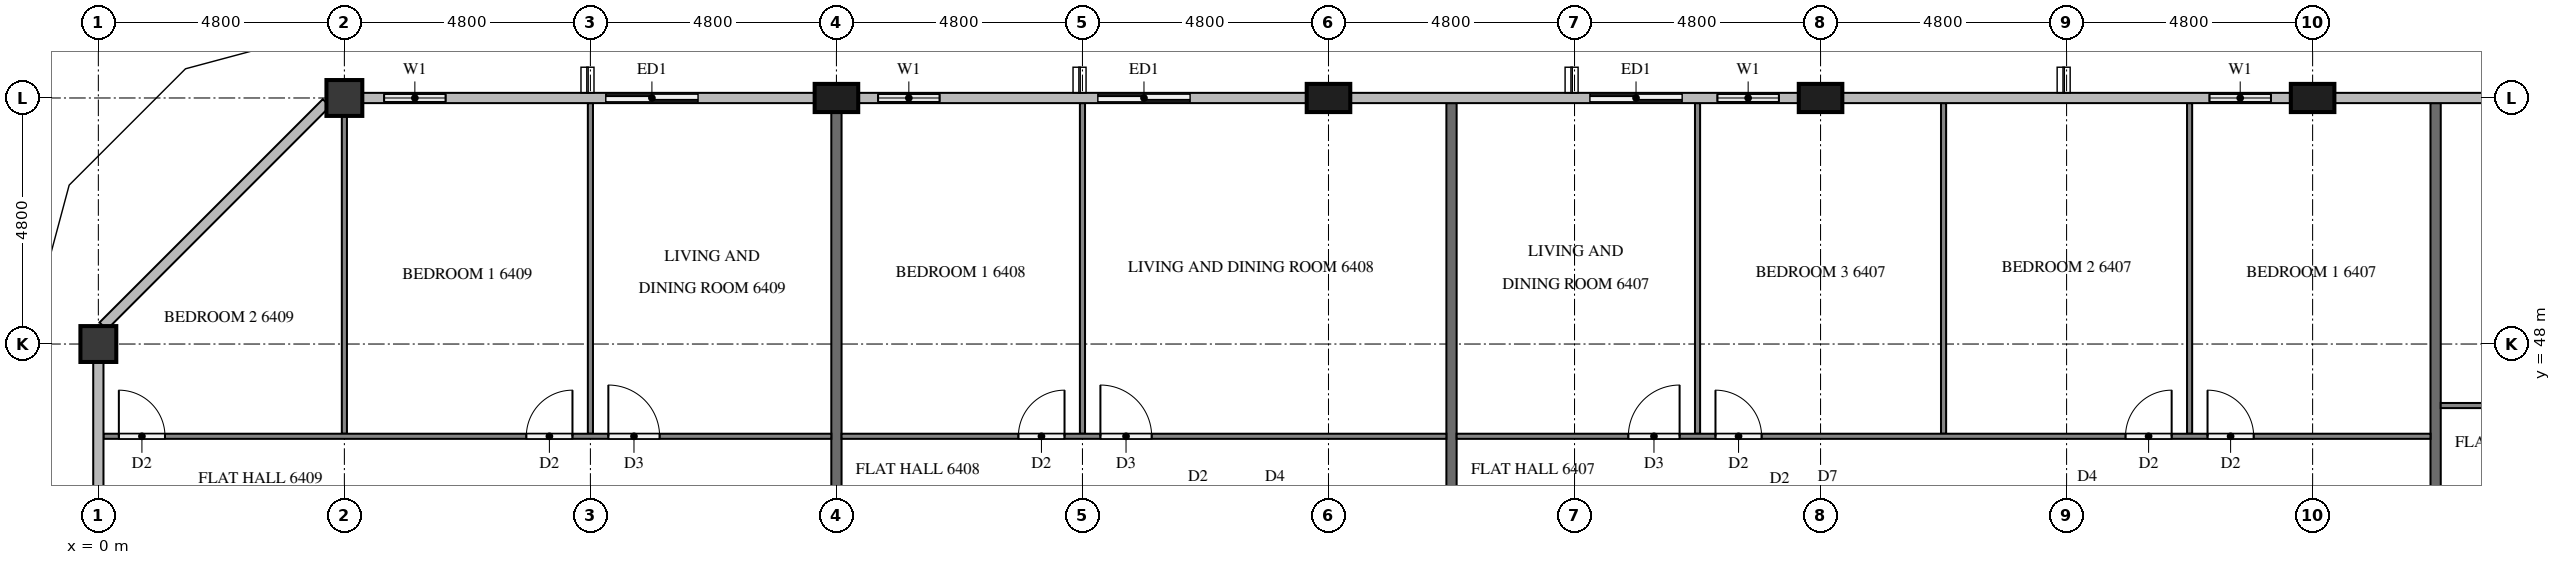
"""IFC4 building model, lengths in metres.
Left out: names, types, materials, properties, quantities, classifications, styles, units other than length and angle.
Written with IfcOpenShell. Run it as: python <this file> out.ifc"""

import sys

from ifc_helpers import new_model, si_unit, direction, frame, frame_2d, origin, origin_2d, place, context, subcontext, project, spatial, rectangle, extrude, element, fill, save


model = new_model("IFC4")
c1 = context("Model", 3, precision=1e-05, world=origin(), true_north=direction((0.0, 1.0)))
c2 = subcontext(c1, "Body", "Model", "MODEL_VIEW")
j1 = project(units=[si_unit("LENGTHUNIT", "METRE"), si_unit("PLANEANGLEUNIT", "RADIAN")], contexts=[c1])
p1 = place(None, origin())
s1 = spatial("IfcSite", under=j1, at=p1, CompositionType="ELEMENT")
p2 = place(p1, origin())
s2 = spatial("IfcBuilding", under=s1, at=p2, CompositionType="ELEMENT")
p3 = place(p2, frame((0.0, 0.0, 245.7)))
s3 = spatial("IfcBuildingStorey", under=s2, at=p3, CompositionType="ELEMENT", Elevation=245.7)
for number, where, z_axis, x_axis in (
    (1, (43.2, 52.8, 0.0), (0.0, 0.0, 1.0), (1.0, 0.0, 0.0)),
    (2, (33.6, 52.8, 0.0), (0.0, 0.0, 1.0), (1.0, 0.0, 0.0)),
    (3, (24.0, 52.8, 0.0), (0.0, 0.0, 1.0), (1.0, 0.0, 0.0)),
    (4, (14.4, 52.8, 0.0), (0.0, 0.0, 1.0), (1.0, 0.0, 0.0)),
):
    element("IfcColumn", number, at=place(p3, frame(where, z_axis=z_axis, x_axis=x_axis)), inside=s3, PredefinedType="COLUMN", context=c2, shape_type="SweptSolid", body=[
        extrude(rectangle(XDim=0.85, YDim=0.55, at=origin_2d()), origin(), (0.0, 0.0, 1.0), 3.2),
    ])
for number, where, z_axis, x_axis in (
    (5, (4.8, 52.8, 0.0), (0.0, 0.0, 1.0), (1.0, 0.0, 0.0)),
    (6, (0.0, 48.0, 0.0), (0.0, 0.0, 1.0), (1.0, 0.0, 0.0)),
):
    element("IfcColumn", number, at=place(p3, frame(where, z_axis=z_axis, x_axis=x_axis)), inside=s3, PredefinedType="COLUMN", context=c2, shape_type="SweptSolid", body=[
        extrude(rectangle(XDim=0.7, YDim=0.7, at=origin_2d()), origin(), (0.0, 0.0, 1.0), 3.2),
    ])
p4 = place(p3, frame((42.775, 52.8, 0.0), z_axis=(0.0, 0.0, 1.0), x_axis=(-1.0, 0.0, 0.0)))
e7 = element("IfcWall", 7, at=p4, inside=s3, PredefinedType="SOLIDWALL", context=c2, shape_type="SweptSolid", body=[
    extrude(rectangle(XDim=1.975, YDim=0.15, at=frame_2d((0.987, 0.0))), origin(), (0.0, 0.0, 1.0), 3.2),
])
p5 = place(p4, frame((0.387, 0.0, 0.9)))
e8 = element("IfcOpeningElement", 8, at=p5, cuts=e7, PredefinedType="OPENING", context=c2, shape_type="SweptSolid", body=[
    extrude(rectangle(XDim=1.2, YDim=1.4, at=frame_2d((0.6, 0.7))), frame((0.0, 0.085, 0.0), z_axis=(0.0, -1.0, 0.0), x_axis=(1.0, 0.0, 0.0)), (0.0, 0.0, 1.0), 0.17),
])
p6 = place(p3, frame((33.175, 52.8, 0.0), z_axis=(0.0, 0.0, 1.0), x_axis=(-1.0, 0.0, 0.0)))
e9 = element("IfcWall", 9, at=p6, inside=s3, PredefinedType="SOLIDWALL", context=c2, shape_type="SweptSolid", body=[
    extrude(rectangle(XDim=4.375, YDim=0.15, at=frame_2d((2.188, 0.0))), origin(), (0.0, 0.0, 1.0), 3.2),
])
p7 = place(p6, frame((0.387, 0.0, 0.9)))
e10 = element("IfcOpeningElement", 10, at=p7, cuts=e9, PredefinedType="OPENING", context=c2, shape_type="SweptSolid", body=[
    extrude(rectangle(XDim=1.2, YDim=1.4, at=frame_2d((0.6, 0.7))), frame((0.0, 0.085, 0.0), z_axis=(0.0, -1.0, 0.0), x_axis=(1.0, 0.0, 0.0)), (0.0, 0.0, 1.0), 0.17),
])
p8 = place(p6, frame((2.275, 0.0, 0.0)))
e11 = element("IfcOpeningElement", 11, at=p8, cuts=e9, PredefinedType="OPENING", context=c2, shape_type="SweptSolid", body=[
    extrude(rectangle(XDim=1.8, YDim=2.4, at=frame_2d((0.9, 1.2))), frame((0.0, 0.085, 0.0), z_axis=(0.0, -1.0, 0.0), x_axis=(1.0, 0.0, 0.0)), (0.0, 0.0, 1.0), 0.17),
])
p9 = place(p3, frame((21.6, 52.8, 0.0), z_axis=(0.0, 0.0, 1.0), x_axis=(-1.0, 0.0, 0.0)))
e12 = element("IfcWall", 12, at=p9, inside=s3, PredefinedType="SOLIDWALL", context=c2, shape_type="SweptSolid", body=[
    extrude(rectangle(XDim=2.4, YDim=0.15, at=frame_2d((1.2, 0.0))), origin(), (0.0, 0.0, 1.0), 3.2),
])
p10 = place(p9, frame((0.3, 0.0, 0.0)))
e13 = element("IfcOpeningElement", 13, at=p10, cuts=e12, PredefinedType="OPENING", context=c2, shape_type="SweptSolid", body=[
    extrude(rectangle(XDim=1.8, YDim=2.4, at=frame_2d((0.9, 1.2))), frame((0.0, 0.085, 0.0), z_axis=(0.0, -1.0, 0.0), x_axis=(1.0, 0.0, 0.0)), (0.0, 0.0, 1.0), 0.17),
])
p11 = place(p3, frame((16.8, 52.8, 0.0), z_axis=(0.0, 0.0, 1.0), x_axis=(-1.0, 0.0, 0.0)))
e14 = element("IfcWall", 14, at=p11, inside=s3, PredefinedType="SOLIDWALL", context=c2, shape_type="SweptSolid", body=[
    extrude(rectangle(XDim=1.975, YDim=0.15, at=frame_2d((0.988, 0.0))), origin(), (0.0, 0.0, 1.0), 3.2),
])
p12 = place(p11, frame((0.387, 0.0, 0.9)))
e15 = element("IfcOpeningElement", 15, at=p12, cuts=e14, PredefinedType="OPENING", context=c2, shape_type="SweptSolid", body=[
    extrude(rectangle(XDim=1.2, YDim=1.4, at=frame_2d((0.6, 0.7))), frame((0.0, 0.085, 0.0), z_axis=(0.0, -1.0, 0.0), x_axis=(1.0, 0.0, 0.0)), (0.0, 0.0, 1.0), 0.17),
])
p13 = place(p3, frame((12.0, 52.8, 0.0), z_axis=(0.0, 0.0, 1.0), x_axis=(-1.0, 0.0, 0.0)))
e16 = element("IfcWall", 16, at=p13, inside=s3, PredefinedType="SOLIDWALL", context=c2, shape_type="SweptSolid", body=[
    extrude(rectangle(XDim=2.4, YDim=0.15, at=frame_2d((1.2, 0.0))), origin(), (0.0, 0.0, 1.0), 3.2),
])
p14 = place(p13, frame((0.3, 0.0, 0.0)))
e17 = element("IfcOpeningElement", 17, at=p14, cuts=e16, PredefinedType="OPENING", context=c2, shape_type="SweptSolid", body=[
    extrude(rectangle(XDim=1.8, YDim=2.4, at=frame_2d((0.9, 1.2))), frame((0.0, 0.085, 0.0), z_axis=(0.0, -1.0, 0.0), x_axis=(1.0, 0.0, 0.0)), (0.0, 0.0, 1.0), 0.17),
])
p15 = place(p3, frame((7.2, 52.8, 0.0), z_axis=(0.0, 0.0, 1.0), x_axis=(-1.0, 0.0, 0.0)))
e18 = element("IfcWall", 18, at=p15, inside=s3, PredefinedType="SOLIDWALL", context=c2, shape_type="SweptSolid", body=[
    extrude(rectangle(XDim=2.05, YDim=0.15, at=frame_2d((1.025, 0.0))), origin(), (0.0, 0.0, 1.0), 3.2),
])
p16 = place(p15, frame((0.425, 0.0, 0.9)))
e19 = element("IfcOpeningElement", 19, at=p16, cuts=e18, PredefinedType="OPENING", context=c2, shape_type="SweptSolid", body=[
    extrude(rectangle(XDim=1.2, YDim=1.4, at=frame_2d((0.6, 0.7))), frame((0.0, 0.085, 0.0), z_axis=(0.0, -1.0, 0.0), x_axis=(1.0, 0.0, 0.0)), (0.0, 0.0, 1.0), 0.17),
])
for number, where, z_axis, x_axis in (
    (20, (45.6, 52.7, 0.0), (0.0, 0.0, 1.0), (0.0, -1.0, 0.0)),
    (21, (26.4, 52.7, 0.0), (0.0, 0.0, 1.0), (0.0, -1.0, 0.0)),
):
    element("IfcWall", number, at=place(p3, frame(where, z_axis=z_axis, x_axis=x_axis)), inside=s3, PredefinedType="PARTITIONING", context=c2, shape_type="SweptSolid", body=[
        extrude(rectangle(XDim=11.8, YDim=0.2, at=frame_2d((5.9, 0.0))), origin(), (0.0, 0.0, 1.0), 3.2),
    ])
p17 = place(p3, frame((14.4, 52.525, 0.0), z_axis=(0.0, 0.0, 1.0), x_axis=(0.0, -1.0, 0.0)))
e22 = element("IfcWall", 22, at=p17, inside=s3, PredefinedType="PARTITIONING", context=c2, shape_type="SweptSolid", body=[
    extrude(rectangle(XDim=11.625, YDim=0.2, at=frame_2d((5.812, 0.0))), origin(), (0.0, 0.0, 1.0), 3.2),
])
p18 = place(p3, frame((45.7, 46.8, 0.0), z_axis=(0.0, 0.0, 1.0), x_axis=(1.0, 0.0, 0.0)))
e23 = element("IfcWall", 23, at=p18, inside=s3, PredefinedType="PARTITIONING", context=c2, shape_type="SweptSolid", body=[
    extrude(rectangle(XDim=11.8, YDim=0.1, at=frame_2d((5.9, 0.0))), origin(), (0.0, 0.0, 1.0), 3.2),
])
p19 = place(p18, frame((3.45, 0.0, 0.0)))
e24 = element("IfcOpeningElement", 24, at=p19, cuts=e23, PredefinedType="OPENING", context=c2, shape_type="SweptSolid", body=[
    extrude(rectangle(XDim=0.9, YDim=2.1, at=frame_2d((0.45, 1.05))), frame((0.0, 0.06, 0.0), z_axis=(0.0, -1.0, 0.0), x_axis=(1.0, 0.0, 0.0)), (0.0, 0.0, 1.0), 0.12),
])
p20 = place(p18, frame((5.05, 0.0, 0.0)))
e25 = element("IfcOpeningElement", 25, at=p20, cuts=e23, PredefinedType="OPENING", context=c2, shape_type="SweptSolid", body=[
    extrude(rectangle(XDim=1.0, YDim=2.1, at=frame_2d((0.5, 1.05))), frame((0.0, 0.06, 0.0), z_axis=(0.0, -1.0, 0.0), x_axis=(1.0, 0.0, 0.0)), (0.0, 0.0, 1.0), 0.12),
])
for number, where, z_axis, x_axis in (
    (26, (40.8, 46.25, 0.0), (0.0, 0.0, 1.0), (0.0, 1.0, 0.0)),
    (27, (36.0, 46.25, 0.0), (0.0, 0.0, 1.0), (0.0, 1.0, 0.0)),
    (28, (31.2, 46.25, 0.0), (0.0, 0.0, 1.0), (0.0, 1.0, 0.0)),
):
    element("IfcWall", number, at=place(p3, frame(where, z_axis=z_axis, x_axis=x_axis)), inside=s3, PredefinedType="PARTITIONING", context=c2, shape_type="SweptSolid", body=[
        extrude(rectangle(XDim=6.45, YDim=0.1, at=frame_2d((3.225, 0.0))), origin(), (0.0, 0.0, 1.0), 3.2),
    ])
p21 = place(p3, frame((26.5, 46.2, 0.0), z_axis=(0.0, 0.0, 1.0), x_axis=(1.0, 0.0, 0.0)))
e29 = element("IfcWall", 29, at=p21, inside=s3, PredefinedType="PARTITIONING", context=c2, shape_type="SweptSolid", body=[
    extrude(rectangle(XDim=19.0, YDim=0.1, at=frame_2d((9.5, 0.0))), origin(), (0.0, 0.0, 1.0), 3.2),
])
p22 = place(p21, frame((14.65, 0.0, 0.0)))
e30 = element("IfcOpeningElement", 30, at=p22, cuts=e29, PredefinedType="OPENING", context=c2, shape_type="SweptSolid", body=[
    extrude(rectangle(XDim=0.9, YDim=2.1, at=frame_2d((0.45, 1.05))), frame((0.0, 0.06, 0.0), z_axis=(0.0, -1.0, 0.0), x_axis=(1.0, 0.0, 0.0)), (0.0, 0.0, 1.0), 0.12),
])
p23 = place(p21, frame((13.05, 0.0, 0.0)))
e31 = element("IfcOpeningElement", 31, at=p23, cuts=e29, PredefinedType="OPENING", context=c2, shape_type="SweptSolid", body=[
    extrude(rectangle(XDim=0.9, YDim=2.1, at=frame_2d((0.45, 1.05))), frame((0.0, 0.06, 0.0), z_axis=(0.0, -1.0, 0.0), x_axis=(1.0, 0.0, 0.0)), (0.0, 0.0, 1.0), 0.12),
])
p24 = place(p21, frame((5.05, 0.0, 0.0)))
e32 = element("IfcOpeningElement", 32, at=p24, cuts=e29, PredefinedType="OPENING", context=c2, shape_type="SweptSolid", body=[
    extrude(rectangle(XDim=0.9, YDim=2.1, at=frame_2d((0.45, 1.05))), frame((0.0, 0.06, 0.0), z_axis=(0.0, -1.0, 0.0), x_axis=(1.0, 0.0, 0.0)), (0.0, 0.0, 1.0), 0.12),
])
p25 = place(p21, frame((3.35, 0.0, 0.0)))
e33 = element("IfcOpeningElement", 33, at=p25, cuts=e29, PredefinedType="OPENING", context=c2, shape_type="SweptSolid", body=[
    extrude(rectangle(XDim=1.0, YDim=2.1, at=frame_2d((0.5, 1.05))), frame((0.0, 0.06, 0.0), z_axis=(0.0, -1.0, 0.0), x_axis=(1.0, 0.0, 0.0)), (0.0, 0.0, 1.0), 0.12),
])
p26 = place(p3, frame((19.2, 46.25, 0.0), z_axis=(0.0, 0.0, 1.0), x_axis=(0.0, 1.0, 0.0)))
e34 = element("IfcWall", 34, at=p26, inside=s3, PredefinedType="PARTITIONING", context=c2, shape_type="SweptSolid", body=[
    extrude(rectangle(XDim=6.45, YDim=0.1, at=frame_2d((3.225, 0.0))), origin(), (0.0, 0.0, 1.0), 3.2),
])
p27 = place(p3, frame((14.5, 46.2, 0.0), z_axis=(0.0, 0.0, 1.0), x_axis=(1.0, 0.0, 0.0)))
e35 = element("IfcWall", 35, at=p27, inside=s3, PredefinedType="PARTITIONING", context=c2, shape_type="SweptSolid", body=[
    extrude(rectangle(XDim=11.8, YDim=0.1, at=frame_2d((5.9, 0.0))), origin(), (0.0, 0.0, 1.0), 3.2),
])
p28 = place(p27, frame((3.45, 0.0, 0.0)))
e36 = element("IfcOpeningElement", 36, at=p28, cuts=e35, PredefinedType="OPENING", context=c2, shape_type="SweptSolid", body=[
    extrude(rectangle(XDim=0.9, YDim=2.1, at=frame_2d((0.45, 1.05))), frame((0.0, 0.06, 0.0), z_axis=(0.0, -1.0, 0.0), x_axis=(1.0, 0.0, 0.0)), (0.0, 0.0, 1.0), 0.12),
])
p29 = place(p27, frame((5.05, 0.0, 0.0)))
e37 = element("IfcOpeningElement", 37, at=p29, cuts=e35, PredefinedType="OPENING", context=c2, shape_type="SweptSolid", body=[
    extrude(rectangle(XDim=1.0, YDim=2.1, at=frame_2d((0.5, 1.05))), frame((0.0, 0.06, 0.0), z_axis=(0.0, -1.0, 0.0), x_axis=(1.0, 0.0, 0.0)), (0.0, 0.0, 1.0), 0.12),
])
p30 = place(p3, frame((9.6, 46.25, 0.0), z_axis=(0.0, 0.0, 1.0), x_axis=(0.0, 1.0, 0.0)))
e38 = element("IfcWall", 38, at=p30, inside=s3, PredefinedType="PARTITIONING", context=c2, shape_type="SweptSolid", body=[
    extrude(rectangle(XDim=6.45, YDim=0.1, at=frame_2d((3.225, 0.0))), origin(), (0.0, 0.0, 1.0), 3.2),
])
p31 = place(p3, frame((4.8, 46.25, 0.0), z_axis=(0.0, 0.0, 1.0), x_axis=(0.0, 1.0, 0.0)))
e39 = element("IfcWall", 39, at=p31, inside=s3, PredefinedType="PARTITIONING", context=c2, shape_type="SweptSolid", body=[
    extrude(rectangle(XDim=6.2, YDim=0.1, at=frame_2d((3.1, 0.0))), origin(), (0.0, 0.0, 1.0), 3.2),
])
p32 = place(p3, frame((0.1, 46.2, 0.0), z_axis=(0.0, 0.0, 1.0), x_axis=(1.0, 0.0, 0.0)))
e40 = element("IfcWall", 40, at=p32, inside=s3, PredefinedType="PARTITIONING", context=c2, shape_type="SweptSolid", body=[
    extrude(rectangle(XDim=14.2, YDim=0.1, at=frame_2d((7.1, 0.0))), origin(), (0.0, 0.0, 1.0), 3.2),
])
p33 = place(p32, frame((9.85, 0.0, 0.0)))
e41 = element("IfcOpeningElement", 41, at=p33, cuts=e40, PredefinedType="OPENING", context=c2, shape_type="SweptSolid", body=[
    extrude(rectangle(XDim=1.0, YDim=2.1, at=frame_2d((0.5, 1.05))), frame((0.0, 0.06, 0.0), z_axis=(0.0, -1.0, 0.0), x_axis=(1.0, 0.0, 0.0)), (0.0, 0.0, 1.0), 0.12),
])
p34 = place(p32, frame((8.25, 0.0, 0.0)))
e42 = element("IfcOpeningElement", 42, at=p34, cuts=e40, PredefinedType="OPENING", context=c2, shape_type="SweptSolid", body=[
    extrude(rectangle(XDim=0.9, YDim=2.1, at=frame_2d((0.45, 1.05))), frame((0.0, 0.06, 0.0), z_axis=(0.0, -1.0, 0.0), x_axis=(1.0, 0.0, 0.0)), (0.0, 0.0, 1.0), 0.12),
])
p35 = place(p32, frame((0.3, 0.0, 0.0)))
e43 = element("IfcOpeningElement", 43, at=p35, cuts=e40, PredefinedType="OPENING", context=c2, shape_type="SweptSolid", body=[
    extrude(rectangle(XDim=0.9, YDim=2.1, at=frame_2d((0.45, 1.05))), frame((0.0, 0.06, 0.0), z_axis=(0.0, -1.0, 0.0), x_axis=(1.0, 0.0, 0.0)), (0.0, 0.0, 1.0), 0.12),
])
p36 = place(p5, origin())
e44 = element("IfcWindow", 44, at=p36, inside=s3, PartitioningType="SINGLE_PANEL", PredefinedType="WINDOW", context=c2, shape_type="SweptSolid", body=[
    extrude(rectangle(XDim=1.2, YDim=1.4, at=frame_2d((0.6, 0.7))), frame((0.0, 0.03, 0.0), z_axis=(0.0, -1.0, 0.0), x_axis=(1.0, 0.0, 0.0)), (0.0, 0.0, 1.0), 0.06),
])
fill(e8, e44)
p37 = place(p7, origin())
e45 = element("IfcWindow", 45, at=p37, inside=s3, PartitioningType="SINGLE_PANEL", PredefinedType="WINDOW", context=c2, shape_type="SweptSolid", body=[
    extrude(rectangle(XDim=1.2, YDim=1.4, at=frame_2d((0.6, 0.7))), frame((0.0, 0.03, 0.0), z_axis=(0.0, -1.0, 0.0), x_axis=(1.0, 0.0, 0.0)), (0.0, 0.0, 1.0), 0.06),
])
fill(e10, e45)
p38 = place(p8, origin())
e46 = element("IfcDoor", 46, at=p38, inside=s3, OperationType="SLIDING_TO_RIGHT", PredefinedType="DOOR", context=c2, shape_type="SweptSolid", body=[
    extrude(rectangle(XDim=1.8, YDim=2.4, at=frame_2d((0.9, 1.2))), frame((0.0, 0.025, 0.0), z_axis=(0.0, -1.0, 0.0), x_axis=(1.0, 0.0, 0.0)), (0.0, 0.0, 1.0), 0.05),
])
fill(e11, e46)
p39 = place(p10, origin())
e47 = element("IfcDoor", 47, at=p39, inside=s3, OperationType="SLIDING_TO_LEFT", PredefinedType="DOOR", context=c2, shape_type="SweptSolid", body=[
    extrude(rectangle(XDim=1.8, YDim=2.4, at=frame_2d((0.9, 1.2))), frame((0.0, 0.025, 0.0), z_axis=(0.0, -1.0, 0.0), x_axis=(1.0, 0.0, 0.0)), (0.0, 0.0, 1.0), 0.05),
])
fill(e13, e47)
p40 = place(p12, origin())
e48 = element("IfcWindow", 48, at=p40, inside=s3, PartitioningType="SINGLE_PANEL", PredefinedType="WINDOW", context=c2, shape_type="SweptSolid", body=[
    extrude(rectangle(XDim=1.2, YDim=1.4, at=frame_2d((0.6, 0.7))), frame((0.0, 0.03, 0.0), z_axis=(0.0, -1.0, 0.0), x_axis=(1.0, 0.0, 0.0)), (0.0, 0.0, 1.0), 0.06),
])
fill(e15, e48)
p41 = place(p14, origin())
e49 = element("IfcDoor", 49, at=p41, inside=s3, OperationType="SLIDING_TO_RIGHT", PredefinedType="DOOR", context=c2, shape_type="SweptSolid", body=[
    extrude(rectangle(XDim=1.8, YDim=2.4, at=frame_2d((0.9, 1.2))), frame((0.0, 0.025, 0.0), z_axis=(0.0, -1.0, 0.0), x_axis=(1.0, 0.0, 0.0)), (0.0, 0.0, 1.0), 0.05),
])
fill(e17, e49)
p42 = place(p16, origin())
e50 = element("IfcWindow", 50, at=p42, inside=s3, PartitioningType="SINGLE_PANEL", PredefinedType="WINDOW", context=c2, shape_type="SweptSolid", body=[
    extrude(rectangle(XDim=1.2, YDim=1.4, at=frame_2d((0.6, 0.7))), frame((0.0, 0.03, 0.0), z_axis=(0.0, -1.0, 0.0), x_axis=(1.0, 0.0, 0.0)), (0.0, 0.0, 1.0), 0.06),
])
fill(e19, e50)
p43 = place(p22, origin())
e51 = element("IfcDoor", 51, at=p43, inside=s3, OperationType="SINGLE_SWING_LEFT", PredefinedType="DOOR", context=c2, shape_type="SweptSolid", body=[
    extrude(rectangle(XDim=0.9, YDim=2.1, at=frame_2d((0.45, 1.05))), frame((0.0, 0.025, 0.0), z_axis=(0.0, -1.0, 0.0), x_axis=(1.0, 0.0, 0.0)), (0.0, 0.0, 1.0), 0.05),
])
fill(e30, e51)
p44 = place(p23, origin())
e52 = element("IfcDoor", 52, at=p44, inside=s3, OperationType="SINGLE_SWING_RIGHT", PredefinedType="DOOR", context=c2, shape_type="SweptSolid", body=[
    extrude(rectangle(XDim=0.9, YDim=2.1, at=frame_2d((0.45, 1.05))), frame((0.0, 0.025, 0.0), z_axis=(0.0, -1.0, 0.0), x_axis=(1.0, 0.0, 0.0)), (0.0, 0.0, 1.0), 0.05),
])
fill(e31, e52)
p45 = place(p24, origin())
e53 = element("IfcDoor", 53, at=p45, inside=s3, OperationType="SINGLE_SWING_LEFT", PredefinedType="DOOR", context=c2, shape_type="SweptSolid", body=[
    extrude(rectangle(XDim=0.9, YDim=2.1, at=frame_2d((0.45, 1.05))), frame((0.0, 0.025, 0.0), z_axis=(0.0, -1.0, 0.0), x_axis=(1.0, 0.0, 0.0)), (0.0, 0.0, 1.0), 0.05),
])
fill(e32, e53)
p46 = place(p25, origin())
e54 = element("IfcDoor", 54, at=p46, inside=s3, OperationType="SINGLE_SWING_RIGHT", PredefinedType="DOOR", context=c2, shape_type="SweptSolid", body=[
    extrude(rectangle(XDim=1.0, YDim=2.1, at=frame_2d((0.5, 1.05))), frame((0.0, 0.025, 0.0), z_axis=(0.0, -1.0, 0.0), x_axis=(1.0, 0.0, 0.0)), (0.0, 0.0, 1.0), 0.05),
])
fill(e33, e54)
p47 = place(p28, origin())
e55 = element("IfcDoor", 55, at=p47, inside=s3, OperationType="SINGLE_SWING_RIGHT", PredefinedType="DOOR", context=c2, shape_type="SweptSolid", body=[
    extrude(rectangle(XDim=0.9, YDim=2.1, at=frame_2d((0.45, 1.05))), frame((0.0, 0.025, 0.0), z_axis=(0.0, -1.0, 0.0), x_axis=(1.0, 0.0, 0.0)), (0.0, 0.0, 1.0), 0.05),
])
fill(e36, e55)
p48 = place(p29, origin())
e56 = element("IfcDoor", 56, at=p48, inside=s3, OperationType="SINGLE_SWING_LEFT", PredefinedType="DOOR", context=c2, shape_type="SweptSolid", body=[
    extrude(rectangle(XDim=1.0, YDim=2.1, at=frame_2d((0.5, 1.05))), frame((0.0, 0.025, 0.0), z_axis=(0.0, -1.0, 0.0), x_axis=(1.0, 0.0, 0.0)), (0.0, 0.0, 1.0), 0.05),
])
fill(e37, e56)
p49 = place(p33, origin())
e57 = element("IfcDoor", 57, at=p49, inside=s3, OperationType="SINGLE_SWING_LEFT", PredefinedType="DOOR", context=c2, shape_type="SweptSolid", body=[
    extrude(rectangle(XDim=1.0, YDim=2.1, at=frame_2d((0.5, 1.05))), frame((0.0, 0.025, 0.0), z_axis=(0.0, -1.0, 0.0), x_axis=(1.0, 0.0, 0.0)), (0.0, 0.0, 1.0), 0.05),
])
fill(e41, e57)
p50 = place(p34, origin())
e58 = element("IfcDoor", 58, at=p50, inside=s3, OperationType="SINGLE_SWING_RIGHT", PredefinedType="DOOR", context=c2, shape_type="SweptSolid", body=[
    extrude(rectangle(XDim=0.9, YDim=2.1, at=frame_2d((0.45, 1.05))), frame((0.0, 0.025, 0.0), z_axis=(0.0, -1.0, 0.0), x_axis=(1.0, 0.0, 0.0)), (0.0, 0.0, 1.0), 0.05),
])
fill(e42, e58)
p51 = place(p35, origin())
e59 = element("IfcDoor", 59, at=p51, inside=s3, OperationType="SINGLE_SWING_LEFT", PredefinedType="DOOR", context=c2, shape_type="SweptSolid", body=[
    extrude(rectangle(XDim=0.9, YDim=2.1, at=frame_2d((0.45, 1.05))), frame((0.0, 0.025, 0.0), z_axis=(0.0, -1.0, 0.0), x_axis=(1.0, 0.0, 0.0)), (0.0, 0.0, 1.0), 0.05),
])
fill(e43, e59)
save(model, sys.argv[1])
